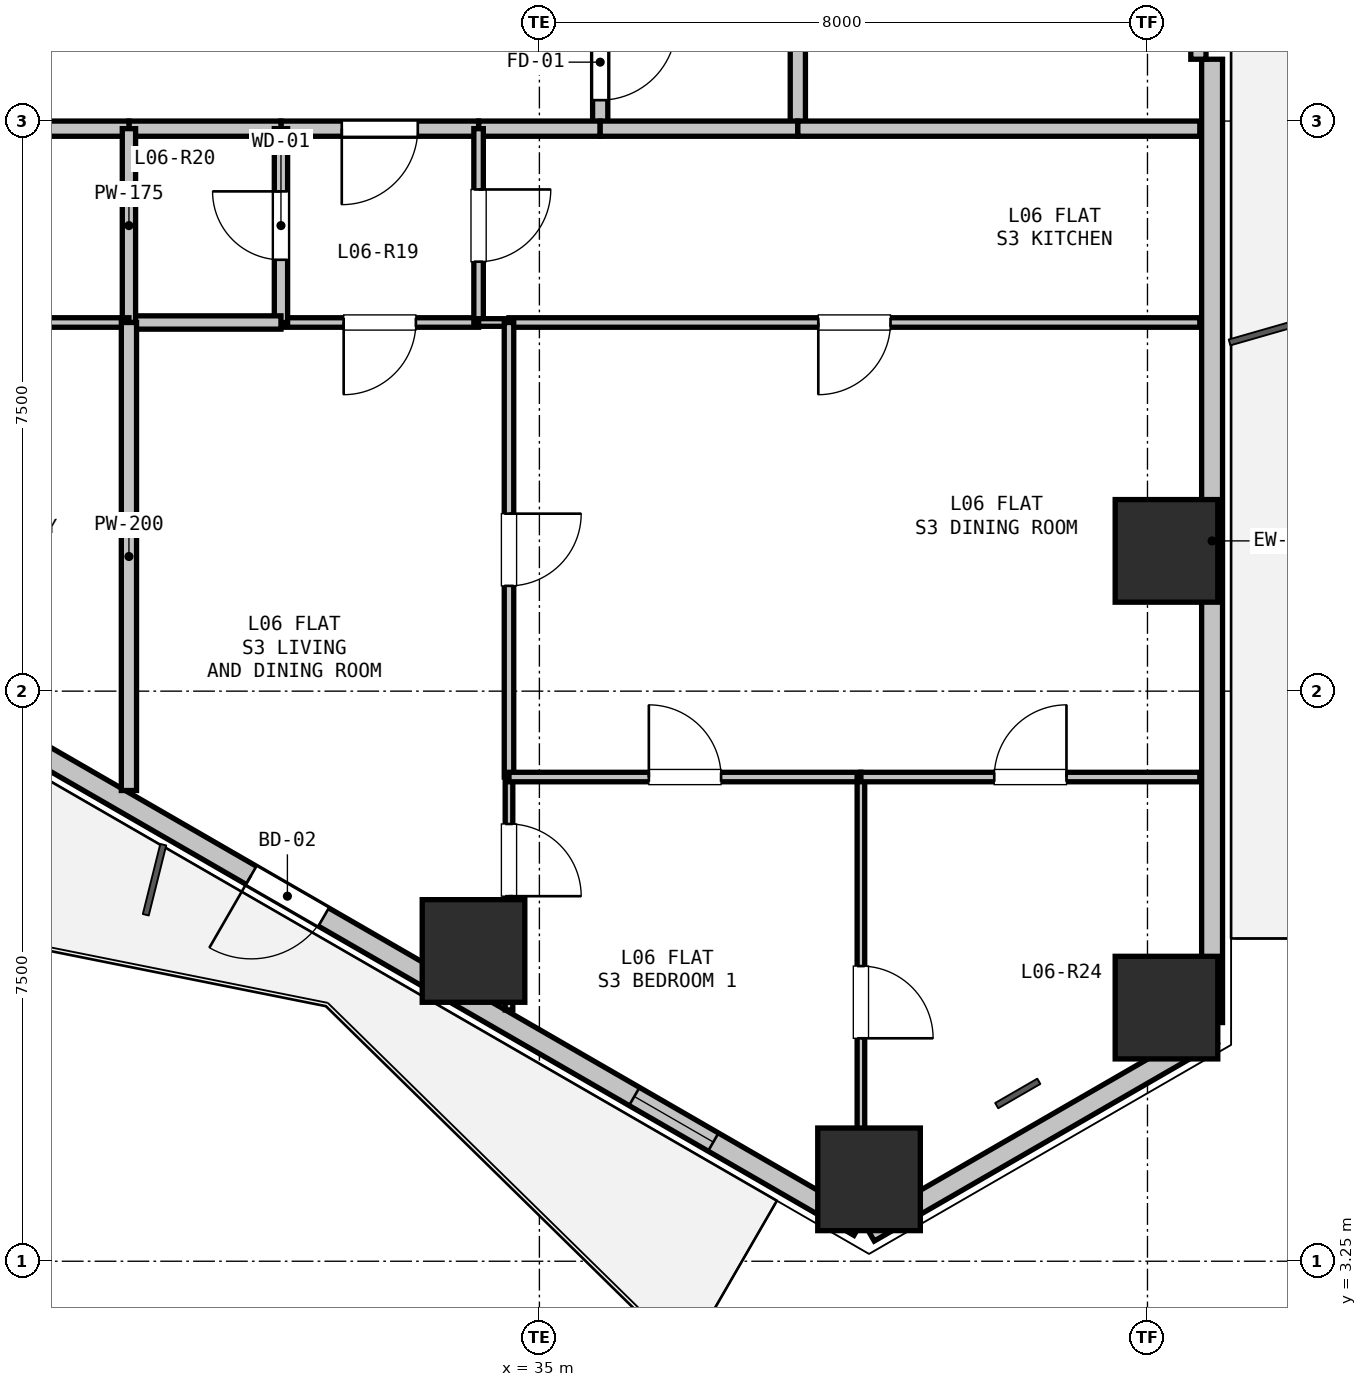
"""IFC4 building model, lengths in metres.
Left out: names, types, materials, properties, quantities, classifications, styles, units other than length and angle.
Written with IfcOpenShell. Run it as: python <this file> out.ifc"""

import sys

from ifc_helpers import new_model, si_unit, direction, frame, frame_2d, origin, origin_2d, place, context, subcontext, project, spatial, rectangle, hollow_rectangle, extrude, element, fill, save


model = new_model("IFC4")
c1 = context("Model", 3, precision=1e-05, world=origin(), true_north=direction((0.0, 1.0)))
c2 = subcontext(c1, "Body", "Model", "MODEL_VIEW")
j1 = project(units=[si_unit("LENGTHUNIT", "METRE"), si_unit("PLANEANGLEUNIT", "RADIAN")], contexts=[c1])
p1 = place(None, origin())
s1 = spatial("IfcSite", under=j1, at=p1, CompositionType="ELEMENT")
p2 = place(p1, origin())
s2 = spatial("IfcBuilding", under=s1, at=p2, CompositionType="ELEMENT")
p3 = place(p2, frame((0.0, 0.0, 25.8)))
s3 = spatial("IfcBuildingStorey", under=s2, at=p3, CompositionType="ELEMENT", Elevation=25.8)
for number, where, z_axis, x_axis in (
    (1, (43.25, 12.595, 0.0), (0.0, 0.0, 1.0), (1.0, 0.0, 0.0)),
    (2, (43.25, 6.587, 0.0), (0.0, 0.0, 1.0), (1.0, 0.0, 0.0)),
    (3, (39.337, 4.327, 0.0), (0.0, 0.0, 1.0), (1.0, 0.0, 0.0)),
    (4, (34.133, 7.332, 0.0), (0.0, 0.0, 1.0), (1.0, 0.0, 0.0)),
):
    element("IfcColumn", number, at=place(p3, frame(where, z_axis=z_axis, x_axis=x_axis)), inside=s3, PredefinedType="COLUMN", context=c2, shape_type="SweptSolid", body=[
        extrude(hollow_rectangle(XDim=1.35, YDim=1.35, WallThickness=0.036, at=origin_2d()), origin(), (0.0, 0.0, 1.0), 3.3),
    ])
p4 = place(p3, frame((43.85, 6.24, 0.0), z_axis=(0.0, 0.0, 1.0), x_axis=(-0.866043601342, -0.499968479581, 0.0)))
e5 = element("IfcWall", 5, at=p4, inside=s3, PredefinedType="SOLIDWALL", context=c2, shape_type="SweptSolid", body=[
    extrude(rectangle(XDim=5.211, YDim=0.275, at=frame_2d((2.605, 0.0))), origin(), (0.0, 0.0, 1.0), 2.66),
])
p5 = place(p3, frame((43.85, 19.063, 0.0), z_axis=(0.0, 0.0, 1.0), x_axis=(0.0, -1.0, 0.0)))
e6 = element("IfcWall", 6, at=p5, inside=s3, PredefinedType="SOLIDWALL", context=c2, shape_type="SweptSolid", body=[
    extrude(rectangle(XDim=12.673, YDim=0.275, at=frame_2d((6.336, 0.0))), origin(), (0.0, 0.0, 1.0), 2.66),
])
p6 = place(p3, frame((43.67, 20.763, 0.0), z_axis=(0.0, 0.0, 1.0), x_axis=(0.0, -1.0, 0.0)))
e7 = element("IfcWall", 7, at=p6, inside=s3, PredefinedType="PARAPET", context=c2, shape_type="SweptSolid", body=[
    extrude(rectangle(XDim=1.7, YDim=0.2, at=frame_2d((0.85, 0.0))), origin(), (0.0, 0.0, 1.0), 2.66),
])
p7 = place(p3, frame((39.207, 3.71, 0.0), z_axis=(0.0, 0.0, 1.0), x_axis=(-0.86603192154, 0.499988710747, 0.0)))
e8 = element("IfcWall", 8, at=p7, inside=s3, PredefinedType="SOLIDWALL", context=c2, shape_type="SweptSolid", body=[
    extrude(rectangle(XDim=12.673, YDim=0.275, at=frame_2d((6.336, 0.0))), origin(), (0.0, 0.0, 1.0), 2.66),
])
p8 = place(p7, frame((8.136, 0.0, 0.0)))
e9 = element("IfcOpeningElement", 9, at=p8, cuts=e8, PredefinedType="OPENING", context=c2, shape_type="SweptSolid", body=[
    extrude(rectangle(XDim=1.1, YDim=2.1, at=frame_2d((0.55, 1.05))), frame((0.0, 0.147, 0.0), z_axis=(0.0, -1.0, 0.0), x_axis=(1.0, 0.0, 0.0)), (0.0, 0.0, 1.0), 0.295),
])
p9 = place(p7, frame((2.216, 0.0, 0.9)))
e10 = element("IfcOpeningElement", 10, at=p9, cuts=e8, PredefinedType="OPENING", context=c2, shape_type="SweptSolid", body=[
    extrude(rectangle(XDim=1.2, YDim=1.4, at=frame_2d((0.6, 0.7))), frame((0.0, 0.147, 0.0), z_axis=(0.0, -1.0, 0.0), x_axis=(1.0, 0.0, 0.0)), (0.0, 0.0, 1.0), 0.295),
])
p10 = place(p3, frame((35.8, 19.9, 0.0), z_axis=(0.0, 0.0, 1.0), x_axis=(0.0, -1.0, 0.0)))
e11 = element("IfcWall", 11, at=p10, inside=s3, PredefinedType="PARTITIONING", context=c2, shape_type="SweptSolid", body=[
    extrude(rectangle(XDim=1.75, YDim=0.2, at=frame_2d((0.875, 0.0))), origin(), (0.0, 0.0, 1.0), 3.04),
])
p11 = place(p10, frame((0.375, 0.0, 0.0)))
e12 = element("IfcOpeningElement", 12, at=p11, cuts=e11, PredefinedType="OPENING", context=c2, shape_type="SweptSolid", body=[
    extrude(rectangle(XDim=1.0, YDim=2.15, at=frame_2d((0.5, 1.075))), frame((0.0, 0.11, 0.0), z_axis=(0.0, -1.0, 0.0), x_axis=(1.0, 0.0, 0.0)), (0.0, 0.0, 1.0), 0.22),
])
p12 = place(p3, frame((35.8, 18.15, 0.0), z_axis=(0.0, 0.0, 1.0), x_axis=(-1.0, 0.0, 0.0)))
e13 = element("IfcWall", 13, at=p12, inside=s3, PredefinedType="PARTITIONING", context=c2, shape_type="SweptSolid", body=[
    extrude(rectangle(XDim=1.6, YDim=0.2, at=frame_2d((0.8, 0.0))), origin(), (0.0, 0.0, 1.0), 3.04),
])
p13 = place(p3, frame((34.2, 18.15, 0.0), z_axis=(0.0, 0.0, 1.0), x_axis=(-1.0, 0.0, 0.0)))
e14 = element("IfcWall", 14, at=p13, inside=s3, PredefinedType="PARTITIONING", context=c2, shape_type="SweptSolid", body=[
    extrude(rectangle(XDim=2.6, YDim=0.2, at=frame_2d((1.3, 0.0))), origin(), (0.0, 0.0, 1.0), 3.04),
])
p14 = place(p13, frame((0.8, 0.0, 0.0)))
e15 = element("IfcOpeningElement", 15, at=p14, cuts=e14, PredefinedType="OPENING", context=c2, shape_type="SweptSolid", body=[
    extrude(rectangle(XDim=1.0, YDim=2.15, at=frame_2d((0.5, 1.075))), frame((0.0, 0.11, 0.0), z_axis=(0.0, -1.0, 0.0), x_axis=(1.0, 0.0, 0.0)), (0.0, 0.0, 1.0), 0.22),
])
p15 = place(p3, frame((31.6, 18.15, 0.0), z_axis=(0.0, 0.0, 1.0), x_axis=(-1.0, 0.0, 0.0)))
e16 = element("IfcWall", 16, at=p15, inside=s3, PredefinedType="PARTITIONING", context=c2, shape_type="SweptSolid", body=[
    extrude(rectangle(XDim=2.0, YDim=0.2, at=frame_2d((1.0, 0.0))), origin(), (0.0, 0.0, 1.0), 3.04),
])
p16 = place(p3, frame((29.6, 18.15, 0.0), z_axis=(0.0, 0.0, 1.0), x_axis=(-1.0, 0.0, 0.0)))
e17 = element("IfcWall", 17, at=p16, inside=s3, PredefinedType="PARTITIONING", context=c2, shape_type="SweptSolid", body=[
    extrude(rectangle(XDim=2.5, YDim=0.2, at=frame_2d((1.25, 0.0))), origin(), (0.0, 0.0, 1.0), 3.04),
])
p17 = place(p3, frame((38.4, 21.4, 0.0), z_axis=(0.0, 0.0, 1.0), x_axis=(0.0, -1.0, 0.0)))
e18 = element("IfcWall", 18, at=p17, inside=s3, PredefinedType="PARTITIONING", context=c2, shape_type="SweptSolid", body=[
    extrude(rectangle(XDim=3.25, YDim=0.2, at=frame_2d((1.625, 0.0))), origin(), (0.0, 0.0, 1.0), 3.04),
])
p18 = place(p3, frame((38.4, 18.15, 0.0), z_axis=(0.0, 0.0, 1.0), x_axis=(-1.0, 0.0, 0.0)))
e19 = element("IfcWall", 19, at=p18, inside=s3, PredefinedType="PARTITIONING", context=c2, shape_type="SweptSolid", body=[
    extrude(rectangle(XDim=2.6, YDim=0.2, at=frame_2d((1.3, 0.0))), origin(), (0.0, 0.0, 1.0), 2.337),
])
p19 = place(p3, frame((34.2, 15.6, 0.0), z_axis=(0.0, 0.0, 1.0), x_axis=(-1.0, 0.0, 0.0)))
e20 = element("IfcWall", 20, at=p19, inside=s3, PredefinedType="PARTITIONING", context=c2, shape_type="SweptSolid", body=[
    extrude(rectangle(XDim=2.6, YDim=0.125, at=frame_2d((1.3, 0.0))), origin(), (0.0, 0.0, 1.0), 3.04),
])
p20 = place(p19, frame((0.825, 0.0, 0.0)))
e21 = element("IfcOpeningElement", 21, at=p20, cuts=e20, PredefinedType="OPENING", context=c2, shape_type="SweptSolid", body=[
    extrude(rectangle(XDim=0.95, YDim=2.1, at=frame_2d((0.475, 1.05))), frame((0.0, 0.073, 0.0), z_axis=(0.0, -1.0, 0.0), x_axis=(1.0, 0.0, 0.0)), (0.0, 0.0, 1.0), 0.145),
])
p21 = place(p3, frame((31.6, 15.6, 0.0), z_axis=(0.0, 0.0, 1.0), x_axis=(0.0, 1.0, 0.0)))
e22 = element("IfcWall", 22, at=p21, inside=s3, PredefinedType="PLUMBINGWALL", context=c2, shape_type="SweptSolid", body=[
    extrude(rectangle(XDim=2.55, YDim=0.175, at=frame_2d((1.275, 0.0))), origin(), (0.0, 0.0, 1.0), 3.04),
])
p22 = place(p21, frame((0.825, 0.0, 0.0)))
e23 = element("IfcOpeningElement", 23, at=p22, cuts=e22, PredefinedType="OPENING", context=c2, shape_type="SweptSolid", body=[
    extrude(rectangle(XDim=0.9, YDim=2.1, at=frame_2d((0.45, 1.05))), frame((0.0, 0.097, 0.0), z_axis=(0.0, -1.0, 0.0), x_axis=(1.0, 0.0, 0.0)), (0.0, 0.0, 1.0), 0.195),
])
p23 = place(p3, frame((34.2, 18.15, 0.0), z_axis=(0.0, 0.0, 1.0), x_axis=(0.0, -1.0, 0.0)))
e24 = element("IfcWall", 24, at=p23, inside=s3, PredefinedType="PARTITIONING", context=c2, shape_type="SweptSolid", body=[
    extrude(rectangle(XDim=2.55, YDim=0.125, at=frame_2d((1.275, 0.0))), origin(), (0.0, 0.0, 1.0), 3.04),
])
p24 = place(p23, frame((0.8, 0.0, 0.0)))
e25 = element("IfcOpeningElement", 25, at=p24, cuts=e24, PredefinedType="OPENING", context=c2, shape_type="SweptSolid", body=[
    extrude(rectangle(XDim=0.95, YDim=2.1, at=frame_2d((0.475, 1.05))), frame((0.0, 0.073, 0.0), z_axis=(0.0, -1.0, 0.0), x_axis=(1.0, 0.0, 0.0)), (0.0, 0.0, 1.0), 0.145),
])
p25 = place(p3, frame((31.6, 15.6, 0.0), z_axis=(0.0, 0.0, 1.0), x_axis=(-1.0, 0.0, 0.0)))
e26 = element("IfcWall", 26, at=p25, inside=s3, PredefinedType="PLUMBINGWALL", context=c2, shape_type="SweptSolid", body=[
    extrude(rectangle(XDim=2.0, YDim=0.175, at=frame_2d((1.0, 0.0))), origin(), (0.0, 0.0, 1.0), 3.04),
])
p26 = place(p3, frame((29.6, 15.6, 0.0), z_axis=(0.0, 0.0, 1.0), x_axis=(0.0, 1.0, 0.0)))
e27 = element("IfcWall", 27, at=p26, inside=s3, PredefinedType="PLUMBINGWALL", context=c2, shape_type="SweptSolid", body=[
    extrude(rectangle(XDim=2.55, YDim=0.175, at=frame_2d((1.275, 0.0))), origin(), (0.0, 0.0, 1.0), 3.04),
])
p27 = place(p3, frame((38.4, 18.15, 0.0), z_axis=(0.0, 0.0, 1.0), x_axis=(1.0, 0.0, 0.0)))
e28 = element("IfcWall", 28, at=p27, inside=s3, PredefinedType="PARTITIONING", context=c2, shape_type="SweptSolid", body=[
    extrude(rectangle(XDim=5.289, YDim=0.2, at=frame_2d((2.644, 0.0))), origin(), (0.0, 0.0, 1.0), 2.365),
])
p28 = place(p3, frame((43.688, 15.6, 0.0), z_axis=(0.0, 0.0, 1.0), x_axis=(-1.0, 0.0, 0.0)))
e29 = element("IfcWall", 29, at=p28, inside=s3, PredefinedType="PARTITIONING", context=c2, shape_type="SweptSolid", body=[
    extrude(rectangle(XDim=9.088, YDim=0.125, at=frame_2d((4.544, 0.0))), origin(), (0.0, 0.0, 1.0), 2.337),
])
p29 = place(p28, frame((4.069, 0.0, 0.0)))
e30 = element("IfcOpeningElement", 30, at=p29, cuts=e29, PredefinedType="OPENING", context=c2, shape_type="SweptSolid", body=[
    extrude(rectangle(XDim=0.95, YDim=2.1, at=frame_2d((0.475, 1.05))), frame((0.0, 0.073, 0.0), z_axis=(0.0, -1.0, 0.0), x_axis=(1.0, 0.0, 0.0)), (0.0, 0.0, 1.0), 0.145),
])
p30 = place(p3, frame((34.6, 15.6, 0.0), z_axis=(0.0, 0.0, 1.0), x_axis=(-1.0, 0.0, 0.0)))
e31 = element("IfcWall", 31, at=p30, inside=s3, PredefinedType="PARTITIONING", context=c2, shape_type="SweptSolid", body=[
    extrude(rectangle(XDim=0.4, YDim=0.1, at=frame_2d((0.2, 0.0))), origin(), (0.0, 0.0, 1.0), 3.04),
])
p31 = place(p3, frame((27.1, 15.6, 0.0), z_axis=(0.0, 0.0, 1.0), x_axis=(1.0, 0.0, 0.0)))
e32 = element("IfcWall", 32, at=p31, inside=s3, PredefinedType="PARTITIONING", context=c2, shape_type="SweptSolid", body=[
    extrude(rectangle(XDim=2.5, YDim=0.125, at=frame_2d((1.25, 0.0))), origin(), (0.0, 0.0, 1.0), 3.04),
])
p32 = place(p3, frame((29.6, 15.6, 0.0), z_axis=(0.0, 0.0, 1.0), x_axis=(0.0, -1.0, 0.0)))
e33 = element("IfcWall", 33, at=p32, inside=s3, PredefinedType="PARTITIONING", context=c2, shape_type="SweptSolid", body=[
    extrude(rectangle(XDim=6.157, YDim=0.2, at=frame_2d((3.079, 0.0))), origin(), (0.0, 0.0, 1.0), 2.337),
])
p33 = place(p3, frame((34.6, 15.6, 0.0), z_axis=(0.0, 0.0, 1.0), x_axis=(0.0, -1.0, 0.0)))
e34 = element("IfcWall", 34, at=p33, inside=s3, PredefinedType="PARTITIONING", context=c2, shape_type="SweptSolid", body=[
    extrude(rectangle(XDim=5.98, YDim=0.125, at=frame_2d((2.99, 0.0))), origin(), (0.0, 0.0, 1.0), 3.04),
])
p34 = place(p33, frame((2.515, 0.0, 0.0)))
e35 = element("IfcOpeningElement", 35, at=p34, cuts=e34, PredefinedType="OPENING", context=c2, shape_type="SweptSolid", body=[
    extrude(rectangle(XDim=0.95, YDim=2.1, at=frame_2d((0.475, 1.05))), frame((0.0, 0.073, 0.0), z_axis=(0.0, -1.0, 0.0), x_axis=(1.0, 0.0, 0.0)), (0.0, 0.0, 1.0), 0.145),
])
p35 = place(p3, frame((34.6, 9.62, 0.0), z_axis=(0.0, 0.0, 1.0), x_axis=(0.0, -1.0, 0.0)))
e36 = element("IfcWall", 36, at=p35, inside=s3, PredefinedType="PARTITIONING", context=c2, shape_type="SweptSolid", body=[
    extrude(rectangle(XDim=3.064, YDim=0.1, at=frame_2d((1.532, 0.0))), origin(), (0.0, 0.0, 1.0), 2.65),
])
p36 = place(p35, frame((0.617, 0.0, 0.0)))
e37 = element("IfcOpeningElement", 37, at=p36, cuts=e36, PredefinedType="OPENING", context=c2, shape_type="SweptSolid", body=[
    extrude(rectangle(XDim=0.95, YDim=2.1, at=frame_2d((0.475, 1.05))), frame((0.0, 0.06, 0.0), z_axis=(0.0, -1.0, 0.0), x_axis=(1.0, 0.0, 0.0)), (0.0, 0.0, 1.0), 0.12),
])
p37 = place(p3, frame((34.6, 9.62, 0.0), z_axis=(0.0, 0.0, 1.0), x_axis=(1.0, 0.0, 0.0)))
e38 = element("IfcWall", 38, at=p37, inside=s3, PredefinedType="PARTITIONING", context=c2, shape_type="SweptSolid", body=[
    extrude(rectangle(XDim=4.63, YDim=0.125, at=frame_2d((2.315, 0.0))), origin(), (0.0, 0.0, 1.0), 3.04),
])
p38 = place(p37, frame((1.84, 0.0, 0.0)))
e39 = element("IfcOpeningElement", 39, at=p38, cuts=e38, PredefinedType="OPENING", context=c2, shape_type="SweptSolid", body=[
    extrude(rectangle(XDim=0.95, YDim=2.1, at=frame_2d((0.475, 1.05))), frame((0.0, 0.073, 0.0), z_axis=(0.0, -1.0, 0.0), x_axis=(1.0, 0.0, 0.0)), (0.0, 0.0, 1.0), 0.145),
])
p39 = place(p3, frame((39.23, 9.62, 0.0), z_axis=(0.0, 0.0, 1.0), x_axis=(0.0, -1.0, 0.0)))
e40 = element("IfcWall", 40, at=p39, inside=s3, PredefinedType="PARTITIONING", context=c2, shape_type="SweptSolid", body=[
    extrude(rectangle(XDim=5.924, YDim=0.1, at=frame_2d((2.962, 0.0))), origin(), (0.0, 0.0, 1.0), 3.04),
])
p40 = place(p39, frame((2.487, 0.0, 0.0)))
e41 = element("IfcOpeningElement", 41, at=p40, cuts=e40, PredefinedType="OPENING", context=c2, shape_type="SweptSolid", body=[
    extrude(rectangle(XDim=0.95, YDim=2.1, at=frame_2d((0.475, 1.05))), frame((0.0, 0.06, 0.0), z_axis=(0.0, -1.0, 0.0), x_axis=(1.0, 0.0, 0.0)), (0.0, 0.0, 1.0), 0.12),
])
p41 = place(p3, frame((39.23, 9.62, 0.0), z_axis=(0.0, 0.0, 1.0), x_axis=(1.0, 0.0, 0.0)))
e42 = element("IfcWall", 42, at=p41, inside=s3, PredefinedType="PARTITIONING", context=c2, shape_type="SweptSolid", body=[
    extrude(rectangle(XDim=4.458, YDim=0.125, at=frame_2d((2.229, 0.0))), origin(), (0.0, 0.0, 1.0), 2.337),
])
p42 = place(p41, frame((1.754, 0.0, 0.0)))
e43 = element("IfcOpeningElement", 43, at=p42, cuts=e42, PredefinedType="OPENING", context=c2, shape_type="SweptSolid", body=[
    extrude(rectangle(XDim=0.95, YDim=2.1, at=frame_2d((0.475, 1.05))), frame((0.0, 0.073, 0.0), z_axis=(0.0, -1.0, 0.0), x_axis=(1.0, 0.0, 0.0)), (0.0, 0.0, 1.0), 0.145),
])
p43 = place(p8, origin())
e44 = element("IfcDoor", 44, at=p43, inside=s3, OperationType="SINGLE_SWING_RIGHT", PredefinedType="DOOR", context=c2, shape_type="SweptSolid", body=[
    extrude(rectangle(XDim=1.1, YDim=2.1, at=frame_2d((0.55, 1.05))), frame((0.0, 0.025, 0.0), z_axis=(0.0, -1.0, 0.0), x_axis=(1.0, 0.0, 0.0)), (0.0, 0.0, 1.0), 0.05),
])
fill(e9, e44)
p44 = place(p9, origin())
e45 = element("IfcWindow", 45, at=p44, inside=s3, PartitioningType="SINGLE_PANEL", PredefinedType="WINDOW", context=c2, shape_type="SweptSolid", body=[
    extrude(rectangle(XDim=1.2, YDim=1.4, at=frame_2d((0.6, 0.7))), frame((0.0, 0.03, 0.0), z_axis=(0.0, -1.0, 0.0), x_axis=(1.0, 0.0, 0.0)), (0.0, 0.0, 1.0), 0.06),
])
fill(e10, e45)
p45 = place(p11, origin())
e46 = element("IfcDoor", 46, at=p45, inside=s3, OperationType="SINGLE_SWING_LEFT", PredefinedType="DOOR", context=c2, shape_type="SweptSolid", body=[
    extrude(rectangle(XDim=1.0, YDim=2.15, at=frame_2d((0.5, 1.075))), frame((0.0, 0.025, 0.0), z_axis=(0.0, -1.0, 0.0), x_axis=(1.0, 0.0, 0.0)), (0.0, 0.0, 1.0), 0.05),
])
fill(e12, e46)
p46 = place(p14, origin())
e47 = element("IfcDoor", 47, at=p46, inside=s3, OperationType="SINGLE_SWING_RIGHT", PredefinedType="DOOR", context=c2, shape_type="SweptSolid", body=[
    extrude(rectangle(XDim=1.0, YDim=2.15, at=frame_2d((0.5, 1.075))), frame((0.0, 0.025, 0.0), z_axis=(0.0, -1.0, 0.0), x_axis=(1.0, 0.0, 0.0)), (0.0, 0.0, 1.0), 0.05),
])
fill(e15, e47)
p47 = place(p22, origin())
e48 = element("IfcDoor", 48, at=p47, inside=s3, OperationType="SINGLE_SWING_RIGHT", PredefinedType="DOOR", context=c2, shape_type="SweptSolid", body=[
    extrude(rectangle(XDim=0.9, YDim=2.1, at=frame_2d((0.45, 1.05))), frame((0.0, 0.025, 0.0), z_axis=(0.0, -1.0, 0.0), x_axis=(1.0, 0.0, 0.0)), (0.0, 0.0, 1.0), 0.05),
])
fill(e23, e48)
p48 = place(p24, origin())
e49 = element("IfcDoor", 49, at=p48, inside=s3, OperationType="SINGLE_SWING_LEFT", PredefinedType="DOOR", context=c2, shape_type="SweptSolid", body=[
    extrude(rectangle(XDim=0.95, YDim=2.1, at=frame_2d((0.475, 1.05))), frame((0.0, 0.025, 0.0), z_axis=(0.0, -1.0, 0.0), x_axis=(1.0, 0.0, 0.0)), (0.0, 0.0, 1.0), 0.05),
])
fill(e25, e49)
p49 = place(p20, origin())
e50 = element("IfcDoor", 50, at=p49, inside=s3, OperationType="SINGLE_SWING_RIGHT", PredefinedType="DOOR", context=c2, shape_type="SweptSolid", body=[
    extrude(rectangle(XDim=0.95, YDim=2.1, at=frame_2d((0.475, 1.05))), frame((0.0, 0.025, 0.0), z_axis=(0.0, -1.0, 0.0), x_axis=(1.0, 0.0, 0.0)), (0.0, 0.0, 1.0), 0.05),
])
fill(e21, e50)
p50 = place(p29, origin())
e51 = element("IfcDoor", 51, at=p50, inside=s3, OperationType="SINGLE_SWING_RIGHT", PredefinedType="DOOR", context=c2, shape_type="SweptSolid", body=[
    extrude(rectangle(XDim=0.95, YDim=2.1, at=frame_2d((0.475, 1.05))), frame((0.0, 0.025, 0.0), z_axis=(0.0, -1.0, 0.0), x_axis=(1.0, 0.0, 0.0)), (0.0, 0.0, 1.0), 0.05),
])
fill(e30, e51)
p51 = place(p36, origin())
e52 = element("IfcDoor", 52, at=p51, inside=s3, OperationType="SINGLE_SWING_RIGHT", PredefinedType="DOOR", context=c2, shape_type="SweptSolid", body=[
    extrude(rectangle(XDim=0.95, YDim=2.1, at=frame_2d((0.475, 1.05))), frame((0.0, 0.025, 0.0), z_axis=(0.0, -1.0, 0.0), x_axis=(1.0, 0.0, 0.0)), (0.0, 0.0, 1.0), 0.05),
])
fill(e37, e52)
p52 = place(p34, origin())
e53 = element("IfcDoor", 53, at=p52, inside=s3, OperationType="SINGLE_SWING_LEFT", PredefinedType="DOOR", context=c2, shape_type="SweptSolid", body=[
    extrude(rectangle(XDim=0.95, YDim=2.1, at=frame_2d((0.475, 1.05))), frame((0.0, 0.025, 0.0), z_axis=(0.0, -1.0, 0.0), x_axis=(1.0, 0.0, 0.0)), (0.0, 0.0, 1.0), 0.05),
])
fill(e35, e53)
p53 = place(p40, origin())
e54 = element("IfcDoor", 54, at=p53, inside=s3, OperationType="SINGLE_SWING_RIGHT", PredefinedType="DOOR", context=c2, shape_type="SweptSolid", body=[
    extrude(rectangle(XDim=0.95, YDim=2.1, at=frame_2d((0.475, 1.05))), frame((0.0, 0.025, 0.0), z_axis=(0.0, -1.0, 0.0), x_axis=(1.0, 0.0, 0.0)), (0.0, 0.0, 1.0), 0.05),
])
fill(e41, e54)
p54 = place(p38, origin())
e55 = element("IfcDoor", 55, at=p54, inside=s3, OperationType="SINGLE_SWING_LEFT", PredefinedType="DOOR", context=c2, shape_type="SweptSolid", body=[
    extrude(rectangle(XDim=0.95, YDim=2.1, at=frame_2d((0.475, 1.05))), frame((0.0, 0.025, 0.0), z_axis=(0.0, -1.0, 0.0), x_axis=(1.0, 0.0, 0.0)), (0.0, 0.0, 1.0), 0.05),
])
fill(e39, e55)
p55 = place(p42, origin())
e56 = element("IfcDoor", 56, at=p55, inside=s3, OperationType="SINGLE_SWING_RIGHT", PredefinedType="DOOR", context=c2, shape_type="SweptSolid", body=[
    extrude(rectangle(XDim=0.95, YDim=2.1, at=frame_2d((0.475, 1.05))), frame((0.0, 0.025, 0.0), z_axis=(0.0, -1.0, 0.0), x_axis=(1.0, 0.0, 0.0)), (0.0, 0.0, 1.0), 0.05),
])
fill(e43, e56)
save(model, sys.argv[1])
